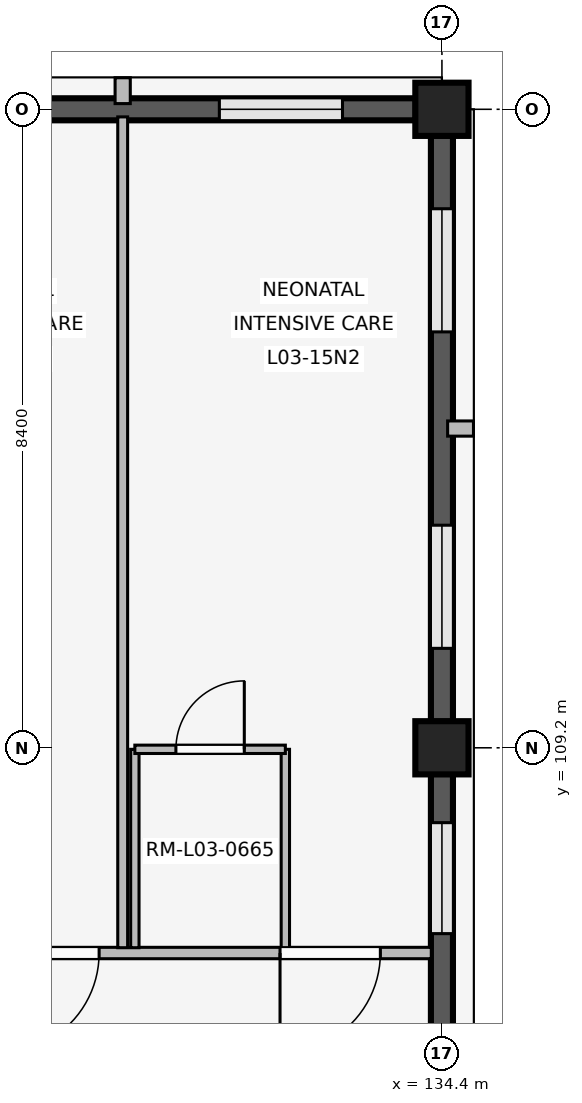
"""IFC4 building model, lengths in metres.
Left out: names, types, materials, properties, quantities, classifications, styles, units other than length and angle.
Written with IfcOpenShell. Run it as: python <this file> out.ifc"""

import sys

from ifc_helpers import new_model, si_unit, direction, frame, frame_2d, origin, origin_2d, place, context, subcontext, project, spatial, rectangle, extrude, element, fill, save


model = new_model("IFC4")
c1 = context("Model", 3, precision=1e-05, world=origin(), true_north=direction((0.0, 1.0)))
c2 = subcontext(c1, "Body", "Model", "MODEL_VIEW")
j1 = project(units=[si_unit("LENGTHUNIT", "METRE"), si_unit("PLANEANGLEUNIT", "RADIAN")], contexts=[c1])
p1 = place(None, origin())
s1 = spatial("IfcSite", under=j1, at=p1, CompositionType="ELEMENT")
p2 = place(p1, origin())
s2 = spatial("IfcBuilding", under=s1, at=p2, CompositionType="ELEMENT")
p3 = place(p2, frame((0.0, 0.0, 12.9)))
s3 = spatial("IfcBuildingStorey", under=s2, at=p3, CompositionType="ELEMENT", Elevation=12.9)
for number, where, z_axis, x_axis in (
    (1, (134.4, 109.2, 0.0), (0.0, 0.0, 1.0), (1.0, 0.0, 0.0)),
    (2, (134.4, 117.6, 0.0), (0.0, 0.0, 1.0), (1.0, 0.0, 0.0)),
):
    element("IfcColumn", number, at=place(p3, frame(where, z_axis=z_axis, x_axis=x_axis)), inside=s3, PredefinedType="COLUMN", context=c2, shape_type="SweptSolid", body=[
        extrude(rectangle(XDim=0.7, YDim=0.7, at=origin_2d()), origin(), (0.0, 0.0, 1.0), 3.3),
    ])
p4 = place(p3, frame((134.4, 108.855, 0.0), z_axis=(0.0, 0.0, 1.0), x_axis=(0.0, -1.0, 0.0)))
e3 = element("IfcWall", 3, at=p4, inside=s3, PredefinedType="SOLIDWALL", context=c2, shape_type="SweptSolid", body=[
    extrude(rectangle(XDim=7.71, YDim=0.29, at=frame_2d((3.855, 0.0))), origin(), (0.0, 0.0, 1.0), 2.44),
])
p5 = place(p4, frame((0.64, 0.0, 0.85)))
e4 = element("IfcOpeningElement", 4, at=p5, cuts=e3, PredefinedType="OPENING", context=c2, shape_type="SweptSolid", body=[
    extrude(rectangle(XDim=1.46, YDim=0.85, at=frame_2d((0.73, 0.425))), frame((0.0, 0.155, 0.0), z_axis=(0.0, -1.0, 0.0), x_axis=(1.0, 0.0, 0.0)), (0.0, 0.0, 1.0), 0.31),
])
p6 = place(p4, frame((5.61, 0.0, 0.85)))
e5 = element("IfcOpeningElement", 5, at=p6, cuts=e3, PredefinedType="OPENING", context=c2, shape_type="SweptSolid", body=[
    extrude(rectangle(XDim=1.46, YDim=0.85, at=frame_2d((0.73, 0.425))), frame((0.0, 0.155, 0.0), z_axis=(0.0, -1.0, 0.0), x_axis=(1.0, 0.0, 0.0)), (0.0, 0.0, 1.0), 0.31),
])
p7 = place(p3, frame((126.345, 117.6, 0.0), z_axis=(0.0, 0.0, 1.0), x_axis=(1.0, 0.0, 0.0)))
e6 = element("IfcWall", 6, at=p7, inside=s3, PredefinedType="SOLIDWALL", context=c2, shape_type="SweptSolid", body=[
    extrude(rectangle(XDim=7.71, YDim=0.29, at=frame_2d((3.855, 0.0))), origin(), (0.0, 0.0, 1.0), 2.44),
])
p8 = place(p7, frame((0.963, 0.0, 0.85)))
e7 = element("IfcOpeningElement", 7, at=p8, cuts=e6, PredefinedType="OPENING", context=c2, shape_type="SweptSolid", body=[
    extrude(rectangle(XDim=1.62, YDim=0.95, at=frame_2d((0.81, 0.475))), frame((0.0, 0.155, 0.0), z_axis=(0.0, -1.0, 0.0), x_axis=(1.0, 0.0, 0.0)), (0.0, 0.0, 1.0), 0.31),
])
p9 = place(p7, frame((5.127, 0.0, 0.85)))
e8 = element("IfcOpeningElement", 8, at=p9, cuts=e6, PredefinedType="OPENING", context=c2, shape_type="SweptSolid", body=[
    extrude(rectangle(XDim=1.62, YDim=0.95, at=frame_2d((0.81, 0.475))), frame((0.0, 0.155, 0.0), z_axis=(0.0, -1.0, 0.0), x_axis=(1.0, 0.0, 0.0)), (0.0, 0.0, 1.0), 0.31),
])
p10 = place(p3, frame((130.2, 117.675, 0.0), z_axis=(0.0, 0.0, 1.0), x_axis=(0.0, 1.0, 0.0)))
e9 = element("IfcWall", 9, at=p10, inside=s3, PredefinedType="ELEMENTEDWALL", context=c2, shape_type="SweptSolid", body=[
    extrude(rectangle(XDim=0.34, YDim=0.2, at=frame_2d((0.17, 0.0))), origin(), (0.0, 0.0, 1.0), 2.42),
])
p11 = place(p3, frame((134.4, 117.255, 0.0), z_axis=(0.0, 0.0, 1.0), x_axis=(0.0, -1.0, 0.0)))
e10 = element("IfcWall", 10, at=p11, inside=s3, PredefinedType="SOLIDWALL", context=c2, shape_type="SweptSolid", body=[
    extrude(rectangle(XDim=7.71, YDim=0.29, at=frame_2d((3.855, 0.0))), origin(), (0.0, 0.0, 1.0), 2.44),
])
p12 = place(p11, frame((0.963, 0.0, 0.85)))
e11 = element("IfcOpeningElement", 11, at=p12, cuts=e10, PredefinedType="OPENING", context=c2, shape_type="SweptSolid", body=[
    extrude(rectangle(XDim=1.62, YDim=0.95, at=frame_2d((0.81, 0.475))), frame((0.0, 0.155, 0.0), z_axis=(0.0, -1.0, 0.0), x_axis=(1.0, 0.0, 0.0)), (0.0, 0.0, 1.0), 0.31),
])
p13 = place(p11, frame((5.127, 0.0, 0.85)))
e12 = element("IfcOpeningElement", 12, at=p13, cuts=e10, PredefinedType="OPENING", context=c2, shape_type="SweptSolid", body=[
    extrude(rectangle(XDim=1.62, YDim=0.95, at=frame_2d((0.81, 0.475))), frame((0.0, 0.155, 0.0), z_axis=(0.0, -1.0, 0.0), x_axis=(1.0, 0.0, 0.0)), (0.0, 0.0, 1.0), 0.31),
])
p14 = place(p3, frame((134.475, 113.4, 0.0), z_axis=(0.0, 0.0, 1.0), x_axis=(1.0, 0.0, 0.0)))
e13 = element("IfcWall", 13, at=p14, inside=s3, PredefinedType="ELEMENTEDWALL", context=c2, shape_type="SweptSolid", body=[
    extrude(rectangle(XDim=0.34, YDim=0.2, at=frame_2d((0.17, 0.0))), origin(), (0.0, 0.0, 1.0), 2.42),
])
p15 = place(p3, frame((134.26, 106.5, 0.0), z_axis=(0.0, 0.0, 1.0), x_axis=(-1.0, 0.0, 0.0)))
e14 = element("IfcWall", 14, at=p15, inside=s3, PredefinedType="PARTITIONING", context=c2, shape_type="SweptSolid", body=[
    extrude(rectangle(XDim=8.18, YDim=0.15, at=frame_2d((4.09, 0.0))), origin(), (0.0, 0.0, 1.0), 2.42),
])
p16 = place(p15, frame((0.67, 0.0, 0.0)))
e15 = element("IfcOpeningElement", 15, at=p16, cuts=e14, PredefinedType="OPENING", context=c2, shape_type="SweptSolid", body=[
    extrude(rectangle(XDim=1.32, YDim=2.25, at=frame_2d((0.66, 1.125))), frame((0.0, 0.085, 0.0), z_axis=(0.0, -1.0, 0.0), x_axis=(1.0, 0.0, 0.0)), (0.0, 0.0, 1.0), 0.17),
])
p17 = place(p15, frame((4.37, 0.0, 0.0)))
e16 = element("IfcOpeningElement", 16, at=p17, cuts=e14, PredefinedType="OPENING", context=c2, shape_type="SweptSolid", body=[
    extrude(rectangle(XDim=1.32, YDim=2.25, at=frame_2d((0.66, 1.125))), frame((0.0, 0.085, 0.0), z_axis=(0.0, -1.0, 0.0), x_axis=(1.0, 0.0, 0.0)), (0.0, 0.0, 1.0), 0.17),
])
p18 = place(p3, frame((130.2, 106.57, 0.0), z_axis=(0.0, 0.0, 1.0), x_axis=(0.0, 1.0, 0.0)))
e17 = element("IfcWall", 17, at=p18, inside=s3, PredefinedType="PARTITIONING", context=c2, shape_type="SweptSolid", body=[
    extrude(rectangle(XDim=10.93, YDim=0.13, at=frame_2d((5.465, 0.0))), origin(), (0.0, 0.0, 1.0), 2.42),
])
for number, where, z_axis, x_axis in (
    (18, (130.36, 106.57, 0.0), (0.0, 0.0, 1.0), (0.0, 1.0, 0.0)),
    (19, (132.34, 106.57, 0.0), (0.0, 0.0, 1.0), (0.0, 1.0, 0.0)),
):
    element("IfcWall", number, at=place(p3, frame(where, z_axis=z_axis, x_axis=x_axis)), inside=s3, PredefinedType="PARTITIONING", context=c2, shape_type="SweptSolid", body=[
        extrude(rectangle(XDim=2.61, YDim=0.11, at=frame_2d((1.305, 0.0))), origin(), (0.0, 0.0, 1.0), 2.42),
    ])
p19 = place(p3, frame((130.36, 109.18, 0.0), z_axis=(0.0, 0.0, 1.0), x_axis=(1.0, 0.0, 0.0)))
e20 = element("IfcWall", 20, at=p19, inside=s3, PredefinedType="PARTITIONING", context=c2, shape_type="SweptSolid", body=[
    extrude(rectangle(XDim=1.98, YDim=0.11, at=frame_2d((0.99, 0.0))), origin(), (0.0, 0.0, 1.0), 2.42),
])
p20 = place(p19, frame((0.54, 0.0, 0.0)))
e21 = element("IfcOpeningElement", 21, at=p20, cuts=e20, PredefinedType="OPENING", context=c2, shape_type="SweptSolid", body=[
    extrude(rectangle(XDim=0.9, YDim=2.1, at=frame_2d((0.45, 1.05))), frame((0.0, 0.065, 0.0), z_axis=(0.0, -1.0, 0.0), x_axis=(1.0, 0.0, 0.0)), (0.0, 0.0, 1.0), 0.13),
])
p21 = place(p5, origin())
e22 = element("IfcWindow", 22, at=p21, inside=s3, PartitioningType="SINGLE_PANEL", PredefinedType="WINDOW", context=c2, shape_type="SweptSolid", body=[
    extrude(rectangle(XDim=1.46, YDim=0.85, at=frame_2d((0.73, 0.425))), frame((0.0, 0.03, 0.0), z_axis=(0.0, -1.0, 0.0), x_axis=(1.0, 0.0, 0.0)), (0.0, 0.0, 1.0), 0.06),
])
fill(e4, e22)
p22 = place(p9, origin())
e23 = element("IfcWindow", 23, at=p22, inside=s3, PartitioningType="SINGLE_PANEL", PredefinedType="WINDOW", context=c2, shape_type="SweptSolid", body=[
    extrude(rectangle(XDim=1.62, YDim=0.95, at=frame_2d((0.81, 0.475))), frame((0.0, 0.03, 0.0), z_axis=(0.0, -1.0, 0.0), x_axis=(1.0, 0.0, 0.0)), (0.0, 0.0, 1.0), 0.06),
])
fill(e8, e23)
p23 = place(p12, origin())
e24 = element("IfcWindow", 24, at=p23, inside=s3, PartitioningType="SINGLE_PANEL", PredefinedType="WINDOW", context=c2, shape_type="SweptSolid", body=[
    extrude(rectangle(XDim=1.62, YDim=0.95, at=frame_2d((0.81, 0.475))), frame((0.0, 0.03, 0.0), z_axis=(0.0, -1.0, 0.0), x_axis=(1.0, 0.0, 0.0)), (0.0, 0.0, 1.0), 0.06),
])
fill(e11, e24)
p24 = place(p13, origin())
e25 = element("IfcWindow", 25, at=p24, inside=s3, PartitioningType="SINGLE_PANEL", PredefinedType="WINDOW", context=c2, shape_type="SweptSolid", body=[
    extrude(rectangle(XDim=1.62, YDim=0.95, at=frame_2d((0.81, 0.475))), frame((0.0, 0.03, 0.0), z_axis=(0.0, -1.0, 0.0), x_axis=(1.0, 0.0, 0.0)), (0.0, 0.0, 1.0), 0.06),
])
fill(e12, e25)
p25 = place(p16, origin())
e26 = element("IfcDoor", 26, at=p25, inside=s3, OperationType="SINGLE_SWING_RIGHT", PredefinedType="DOOR", context=c2, shape_type="SweptSolid", body=[
    extrude(rectangle(XDim=1.32, YDim=2.25, at=frame_2d((0.66, 1.125))), frame((0.0, 0.025, 0.0), z_axis=(0.0, -1.0, 0.0), x_axis=(1.0, 0.0, 0.0)), (0.0, 0.0, 1.0), 0.05),
])
fill(e15, e26)
p26 = place(p17, origin())
e27 = element("IfcDoor", 27, at=p26, inside=s3, OperationType="SINGLE_SWING_RIGHT", PredefinedType="DOOR", context=c2, shape_type="SweptSolid", body=[
    extrude(rectangle(XDim=1.32, YDim=2.25, at=frame_2d((0.66, 1.125))), frame((0.0, 0.025, 0.0), z_axis=(0.0, -1.0, 0.0), x_axis=(1.0, 0.0, 0.0)), (0.0, 0.0, 1.0), 0.05),
])
fill(e16, e27)
p27 = place(p20, origin())
e28 = element("IfcDoor", 28, at=p27, inside=s3, OperationType="SINGLE_SWING_RIGHT", PredefinedType="DOOR", context=c2, shape_type="SweptSolid", body=[
    extrude(rectangle(XDim=0.9, YDim=2.1, at=frame_2d((0.45, 1.05))), frame((0.0, 0.025, 0.0), z_axis=(0.0, -1.0, 0.0), x_axis=(1.0, 0.0, 0.0)), (0.0, 0.0, 1.0), 0.05),
])
fill(e21, e28)
save(model, sys.argv[1])
